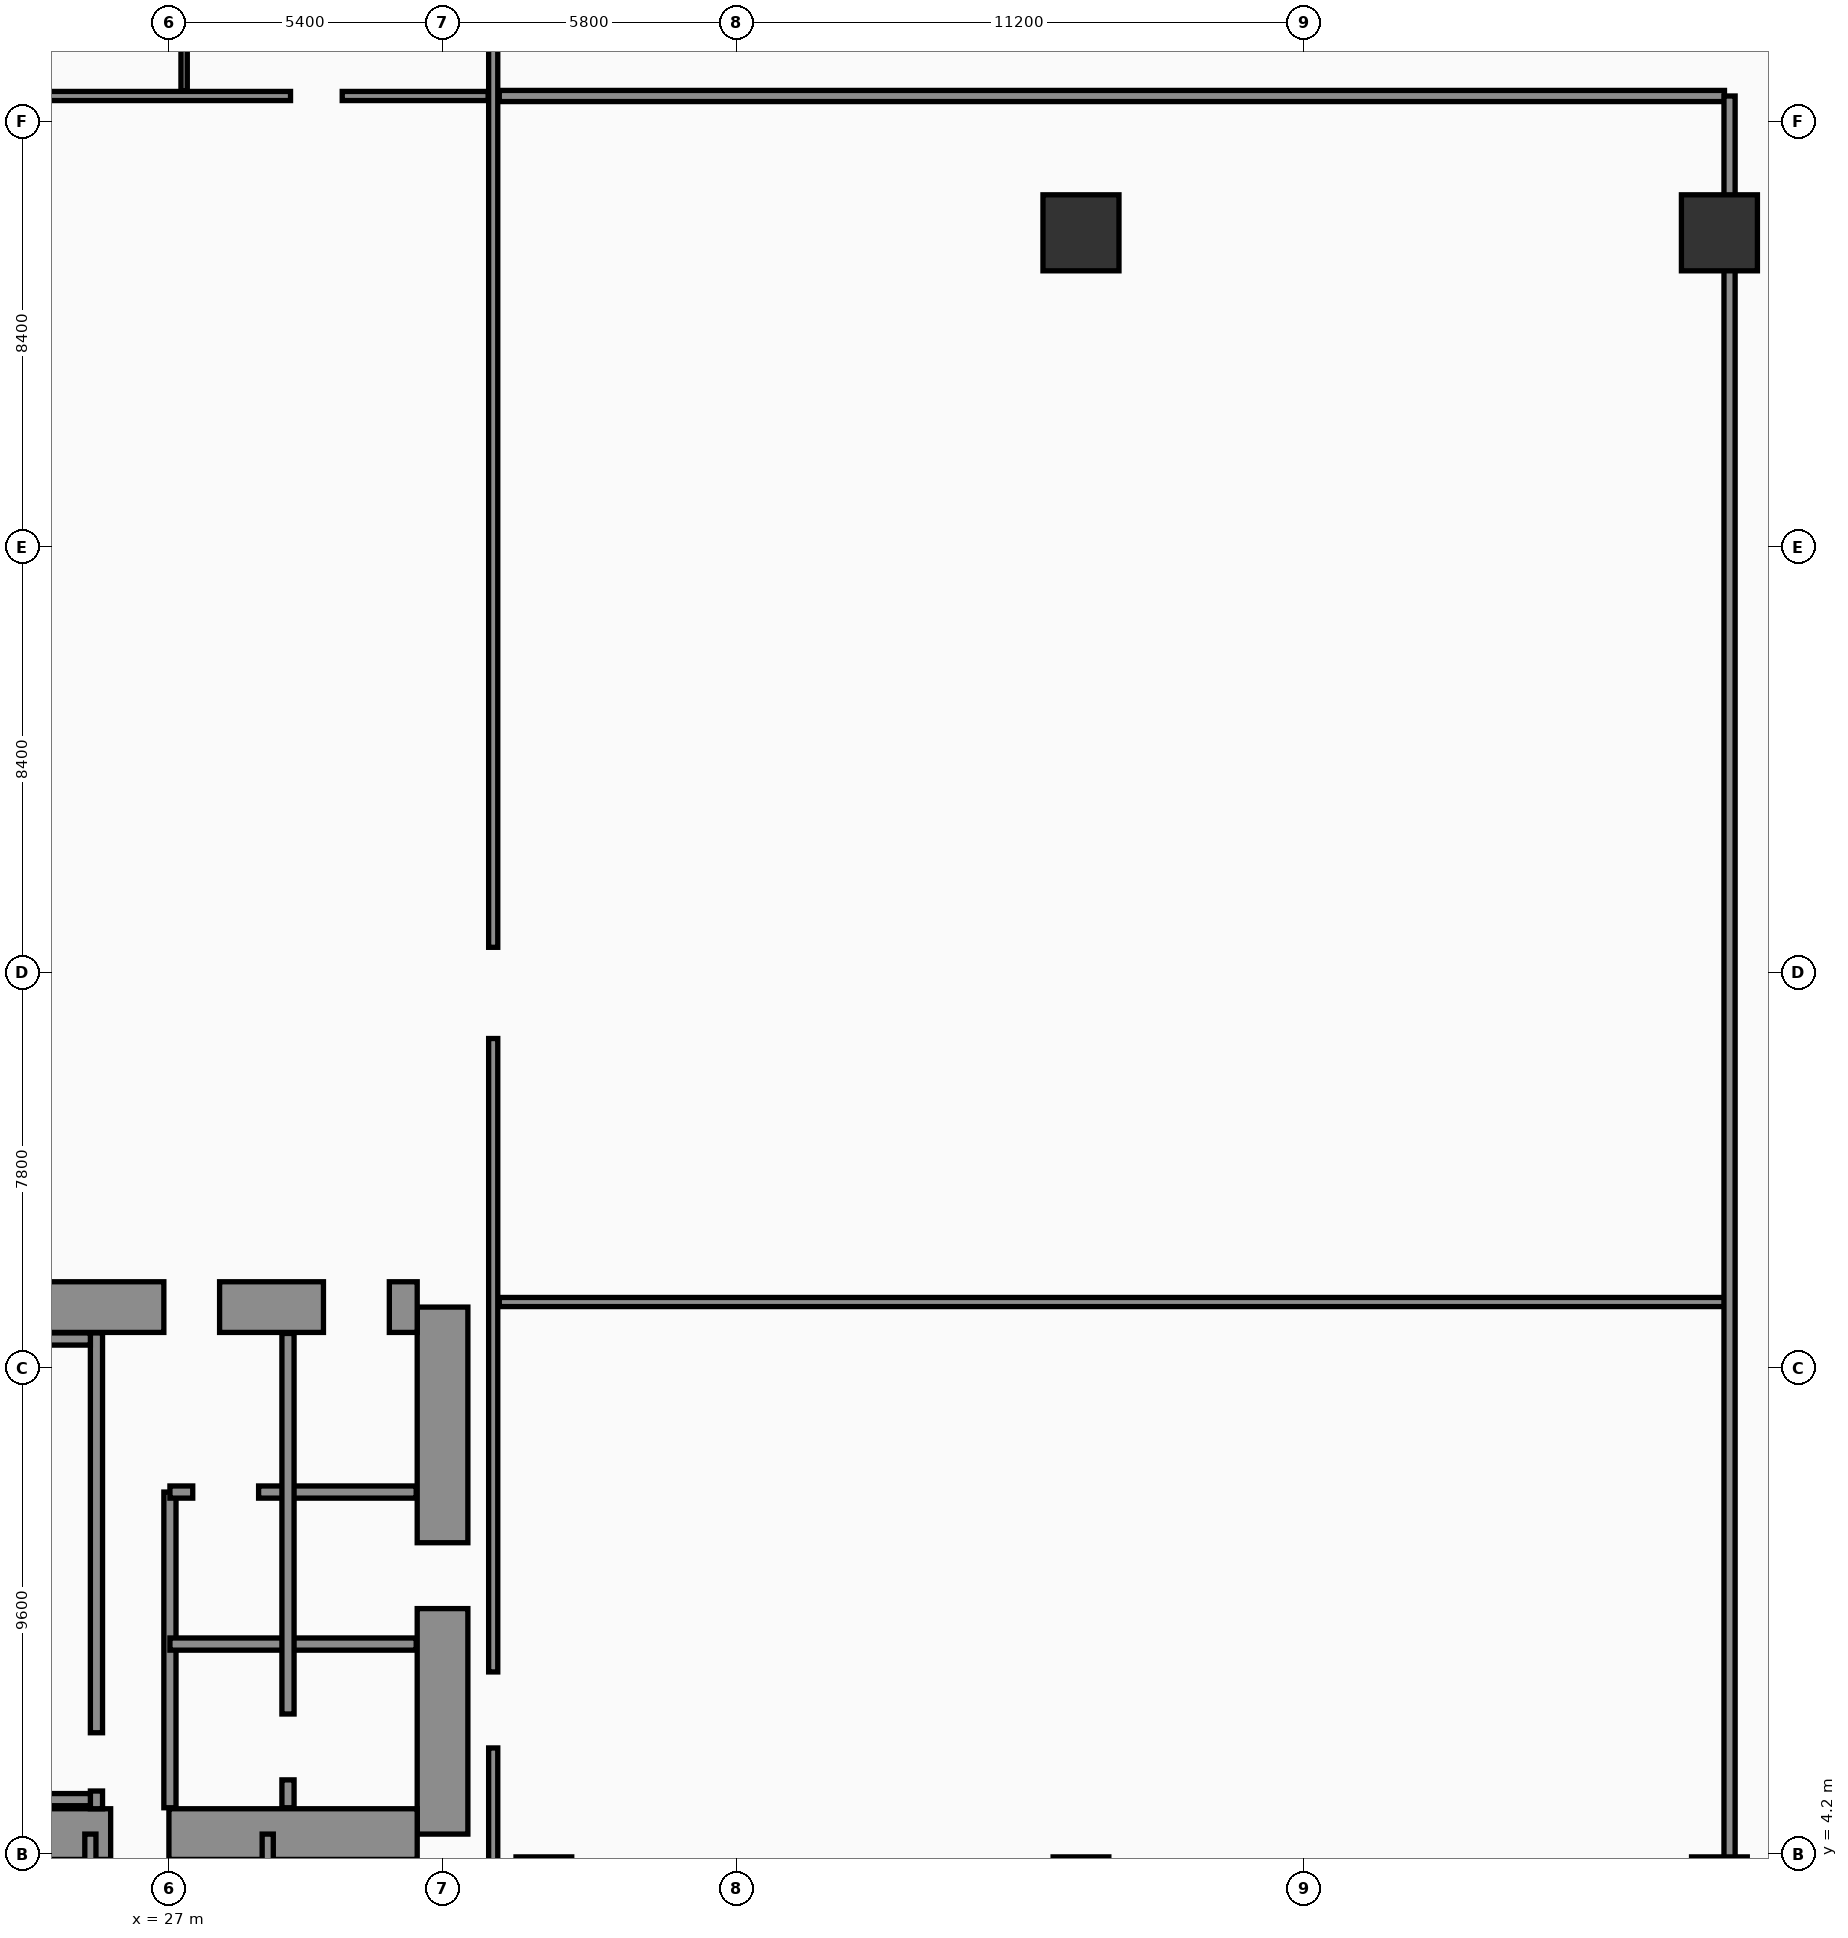
"""IFC4 building model, lengths in metres.
Left out: names, types, materials, properties, quantities, classifications, styles, units other than length and angle.
Written with IfcOpenShell. Run it as: python <this file> out.ifc"""

import sys

from ifc_helpers import new_model, si_unit, direction, frame, frame_2d, origin, origin_2d, place, context, subcontext, project, spatial, rectangle, hollow_rectangle, extrude, element, fill, save


model = new_model("IFC4")
c1 = context("Model", 3, precision=1e-05, world=origin(), true_north=direction((0.0, 1.0)))
c2 = subcontext(c1, "Body", "Model", "MODEL_VIEW")
j1 = project(units=[si_unit("LENGTHUNIT", "METRE"), si_unit("PLANEANGLEUNIT", "RADIAN")], contexts=[c1])
p1 = place(None, origin())
s1 = spatial("IfcSite", under=j1, at=p1, CompositionType="ELEMENT")
p2 = place(p1, origin())
s2 = spatial("IfcBuilding", under=s1, at=p2, CompositionType="ELEMENT")
p3 = place(p2, origin())
s3 = spatial("IfcBuildingStorey", under=s2, at=p3, CompositionType="ELEMENT", Elevation=0.0)
p4 = place(p3, frame((32.4, 4.6, 0.0), z_axis=(0.0, 0.0, 1.0), x_axis=(0.0, 1.0, 0.0)))
e1 = element("IfcWall", 1, at=p4, inside=s3, PredefinedType="SHEAR", context=c2, shape_type="SweptSolid", body=[
    extrude(rectangle(XDim=10.4, YDim=1.0, at=frame_2d((5.2, 0.0))), origin(), (0.0, 0.0, 1.0), 5.68),
])
p5 = place(p4, frame((4.45, 0.0, 0.0)))
e2 = element("IfcOpeningElement", 2, at=p5, cuts=e1, PredefinedType="OPENING", context=c2, shape_type="SweptSolid", body=[
    extrude(rectangle(XDim=1.3, YDim=2.35, at=frame_2d((0.65, 1.175))), frame((0.0, 0.51, 0.0), z_axis=(0.0, -1.0, 0.0), x_axis=(1.0, 0.0, 0.0)), (0.0, 0.0, 1.0), 1.02),
])
p6 = place(p3, frame((22.1, 15.0, 0.0), z_axis=(0.0, 0.0, 1.0), x_axis=(1.0, 0.0, 0.0)))
e3 = element("IfcWall", 3, at=p6, inside=s3, PredefinedType="SHEAR", context=c2, shape_type="SweptSolid", body=[
    extrude(rectangle(XDim=9.8, YDim=1.0, at=frame_2d((4.9, 0.0))), origin(), (0.0, 0.0, 1.0), 5.68),
])
p7 = place(p6, frame((4.8, 0.0, 0.0)))
e4 = element("IfcOpeningElement", 4, at=p7, cuts=e3, PredefinedType="OPENING", context=c2, shape_type="SweptSolid", body=[
    extrude(rectangle(XDim=1.1, YDim=2.2, at=frame_2d((0.55, 1.1))), frame((0.0, 0.51, 0.0), z_axis=(0.0, -1.0, 0.0), x_axis=(1.0, 0.0, 0.0)), (0.0, 0.0, 1.0), 1.02),
])
p8 = place(p6, frame((7.95, 0.0, 0.0)))
e5 = element("IfcOpeningElement", 5, at=p8, cuts=e3, PredefinedType="OPENING", context=c2, shape_type="SweptSolid", body=[
    extrude(rectangle(XDim=1.3, YDim=2.35, at=frame_2d((0.65, 1.175))), frame((0.0, 0.51, 0.0), z_axis=(0.0, -1.0, 0.0), x_axis=(1.0, 0.0, 0.0)), (0.0, 0.0, 1.0), 1.02),
])
p9 = place(p3, frame((22.1, 4.6, 0.0), z_axis=(0.0, 0.0, 1.0), x_axis=(1.0, 0.0, 0.0)))
e6 = element("IfcWall", 6, at=p9, inside=s3, PredefinedType="SHEAR", context=c2, shape_type="SweptSolid", body=[
    extrude(rectangle(XDim=9.8, YDim=1.0, at=frame_2d((4.9, 0.0))), origin(), (0.0, 0.0, 1.0), 5.68),
])
p10 = place(p9, frame((3.75, 0.0, 0.0)))
e7 = element("IfcOpeningElement", 7, at=p10, cuts=e6, PredefinedType="OPENING", context=c2, shape_type="SweptSolid", body=[
    extrude(rectangle(XDim=1.15, YDim=2.2, at=frame_2d((0.575, 1.1))), frame((0.0, 0.51, 0.0), z_axis=(0.0, -1.0, 0.0), x_axis=(1.0, 0.0, 0.0)), (0.0, 0.0, 1.0), 1.02),
])
p11 = place(p3, frame((25.57, 5.1, 0.0), z_axis=(0.0, 0.0, 1.0), x_axis=(0.0, 1.0, 0.0)))
e8 = element("IfcWall", 8, at=p11, inside=s3, PredefinedType="SOLIDWALL", context=c2, shape_type="SweptSolid", body=[
    extrude(rectangle(XDim=9.39, YDim=0.24, at=frame_2d((4.695, 0.0))), origin(), (0.0, 0.0, 1.0), 5.68),
])
p12 = place(p11, frame((0.35, 0.0, 0.0)))
e9 = element("IfcOpeningElement", 9, at=p12, cuts=e8, PredefinedType="OPENING", context=c2, shape_type="SweptSolid", body=[
    extrude(rectangle(XDim=1.15, YDim=2.2, at=frame_2d((0.575, 1.1))), frame((0.0, 0.13, 0.0), z_axis=(0.0, -1.0, 0.0), x_axis=(1.0, 0.0, 0.0)), (0.0, 0.0, 1.0), 0.26),
])
for number, where, z_axis, x_axis in (
    (10, (22.35, 5.28, 0.0), (0.0, 0.0, 1.0), (1.0, 0.0, 0.0)),
    (11, (22.35, 14.37, 0.0), (0.0, 0.0, 1.0), (1.0, 0.0, 0.0)),
):
    element("IfcWall", number, at=place(p3, frame(where, z_axis=z_axis, x_axis=x_axis)), inside=s3, PredefinedType="SOLIDWALL", context=c2, shape_type="SweptSolid", body=[
        extrude(rectangle(XDim=3.1, YDim=0.24, at=frame_2d((1.55, 0.0))), origin(), (0.0, 0.0, 1.0), 5.68),
    ])
for number, where, z_axis, x_axis in (
    (12, (34.4, 3.6, 0.0), (0.0, 0.0, 1.0), (1.0, 0.0, 0.0)),
    (13, (45.0, 3.6, 0.0), (0.0, 0.0, 1.0), (1.0, 0.0, 0.0)),
    (14, (57.6, 3.6, 0.0), (0.0, 0.0, 1.0), (1.0, 0.0, 0.0)),
):
    element("IfcColumn", number, at=place(p3, frame(where, z_axis=z_axis, x_axis=x_axis)), inside=s3, PredefinedType="COLUMN", context=c2, shape_type="SweptSolid", body=[
        extrude(hollow_rectangle(XDim=1.1, YDim=1.1, WallThickness=0.045, at=origin_2d()), origin(), (0.0, 0.0, 1.0), 5.68),
    ])
for number, where, z_axis, x_axis in (
    (15, (45.0, 36.2, 0.0), (0.0, 0.0, 1.0), (1.0, 0.0, 0.0)),
    (16, (57.6, 36.2, 0.0), (0.0, 0.0, 1.0), (1.0, 0.0, 0.0)),
):
    element("IfcColumn", number, at=place(p3, frame(where, z_axis=z_axis, x_axis=x_axis)), inside=s3, PredefinedType="COLUMN", context=c2, shape_type="SweptSolid", body=[
        extrude(rectangle(XDim=1.5, YDim=1.5, at=origin_2d()), origin(), (0.0, 0.0, 1.0), 5.68),
    ])
p13 = place(p3, frame((27.02, 5.12, 0.0), z_axis=(0.0, 0.0, 1.0), x_axis=(0.0, 1.0, 0.0)))
e17 = element("IfcWall", 17, at=p13, inside=s3, PredefinedType="SOLIDWALL", context=c2, shape_type="SweptSolid", body=[
    extrude(rectangle(XDim=6.23, YDim=0.24, at=frame_2d((3.115, 0.0))), origin(), (0.0, 0.0, 1.0), 5.68),
])
p14 = place(p3, frame((27.02, 11.35, 0.0), z_axis=(0.0, 0.0, 1.0), x_axis=(1.0, 0.0, 0.0)))
e18 = element("IfcWall", 18, at=p14, inside=s3, PredefinedType="SOLIDWALL", context=c2, shape_type="SweptSolid", body=[
    extrude(rectangle(XDim=4.86, YDim=0.24, at=frame_2d((2.43, 0.0))), origin(), (0.0, 0.0, 1.0), 5.68),
])
p15 = place(p14, frame((0.45, 0.0, 0.0)))
e19 = element("IfcOpeningElement", 19, at=p15, cuts=e18, PredefinedType="OPENING", context=c2, shape_type="SweptSolid", body=[
    extrude(rectangle(XDim=1.3, YDim=2.35, at=frame_2d((0.65, 1.175))), frame((0.0, 0.13, 0.0), z_axis=(0.0, -1.0, 0.0), x_axis=(1.0, 0.0, 0.0)), (0.0, 0.0, 1.0), 0.26),
])
p16 = place(p3, frame((27.02, 8.35, 0.0), z_axis=(0.0, 0.0, 1.0), x_axis=(1.0, 0.0, 0.0)))
e20 = element("IfcWall", 20, at=p16, inside=s3, PredefinedType="SOLIDWALL", context=c2, shape_type="SweptSolid", body=[
    extrude(rectangle(XDim=4.86, YDim=0.24, at=frame_2d((2.43, 0.0))), origin(), (0.0, 0.0, 1.0), 5.68),
])
p17 = place(p3, frame((29.35, 5.12, 0.0), z_axis=(0.0, 0.0, 1.0), x_axis=(0.0, 1.0, 0.0)))
e21 = element("IfcWall", 21, at=p17, inside=s3, PredefinedType="SOLIDWALL", context=c2, shape_type="SweptSolid", body=[
    extrude(rectangle(XDim=9.36, YDim=0.24, at=frame_2d((4.68, 0.0))), origin(), (0.0, 0.0, 1.0), 5.68),
])
p18 = place(p17, frame((0.55, 0.0, 0.0)))
e22 = element("IfcOpeningElement", 22, at=p18, cuts=e21, PredefinedType="OPENING", context=c2, shape_type="SweptSolid", body=[
    extrude(rectangle(XDim=1.3, YDim=2.35, at=frame_2d((0.65, 1.175))), frame((0.0, 0.13, 0.0), z_axis=(0.0, -1.0, 0.0), x_axis=(1.0, 0.0, 0.0)), (0.0, 0.0, 1.0), 0.26),
])
for number, where, z_axis, x_axis in (
    (23, (25.45, 0.25, 0.0), (0.0, 0.0, 1.0), (0.0, 1.0, 0.0)),
    (24, (28.95, 0.25, 0.0), (0.0, 0.0, 1.0), (0.0, 1.0, 0.0)),
):
    element("IfcWall", number, at=place(p3, frame(where, z_axis=z_axis, x_axis=x_axis)), inside=s3, PredefinedType="SOLIDWALL", context=c2, shape_type="SweptSolid", body=[
        extrude(rectangle(XDim=4.35, YDim=0.22, at=frame_2d((2.175, 0.0))), origin(), (0.0, 0.0, 1.0), 5.18),
    ])
p19 = place(p3, frame((15.2, 38.9, 0.0), z_axis=(0.0, 0.0, 1.0), x_axis=(1.0, 0.0, 0.0)))
e25 = element("IfcWall", 25, at=p19, inside=s3, PredefinedType="PARTITIONING", context=c2, shape_type="SweptSolid", body=[
    extrude(rectangle(XDim=18.1, YDim=0.18, at=frame_2d((9.05, 0.0))), origin(), (0.0, 0.0, 1.0), 4.88),
])
p20 = place(p19, frame((2.2, 0.0, 0.0)))
e26 = element("IfcOpeningElement", 26, at=p20, cuts=e25, PredefinedType="OPENING", context=c2, shape_type="SweptSolid", body=[
    extrude(rectangle(XDim=1.02, YDim=2.2, at=frame_2d((0.51, 1.1))), frame((0.0, 0.1, 0.0), z_axis=(0.0, -1.0, 0.0), x_axis=(1.0, 0.0, 0.0)), (0.0, 0.0, 1.0), 0.2),
])
p21 = place(p19, frame((8.2, 0.0, 0.0)))
e27 = element("IfcOpeningElement", 27, at=p21, cuts=e25, PredefinedType="OPENING", context=c2, shape_type="SweptSolid", body=[
    extrude(rectangle(XDim=1.02, YDim=2.2, at=frame_2d((0.51, 1.1))), frame((0.0, 0.1, 0.0), z_axis=(0.0, -1.0, 0.0), x_axis=(1.0, 0.0, 0.0)), (0.0, 0.0, 1.0), 0.2),
])
p22 = place(p19, frame((14.2, 0.0, 0.0)))
e28 = element("IfcOpeningElement", 28, at=p22, cuts=e25, PredefinedType="OPENING", context=c2, shape_type="SweptSolid", body=[
    extrude(rectangle(XDim=1.02, YDim=2.2, at=frame_2d((0.51, 1.1))), frame((0.0, 0.1, 0.0), z_axis=(0.0, -1.0, 0.0), x_axis=(1.0, 0.0, 0.0)), (0.0, 0.0, 1.0), 0.2),
])
p23 = place(p3, frame((27.3, 39.0, 0.0), z_axis=(0.0, 0.0, 1.0), x_axis=(0.0, 1.0, 0.0)))
e29 = element("IfcWall", 29, at=p23, inside=s3, PredefinedType="PARTITIONING", context=c2, shape_type="SweptSolid", body=[
    extrude(rectangle(XDim=6.2, YDim=0.125, at=frame_2d((3.1, 0.0))), origin(), (0.0, 0.0, 1.0), 5.68),
])
p24 = place(p3, frame((33.4, 0.3, 0.0), z_axis=(0.0, 0.0, 1.0), x_axis=(0.0, 1.0, 0.0)))
e30 = element("IfcWall", 30, at=p24, inside=s3, PredefinedType="PARTITIONING", context=c2, shape_type="SweptSolid", body=[
    extrude(rectangle(XDim=57.64, YDim=0.18, at=frame_2d((28.82, 0.0))), origin(), (0.0, 0.0, 1.0), 4.88),
])
p25 = place(p24, frame((6.0, 0.0, 0.0)))
e31 = element("IfcOpeningElement", 31, at=p25, cuts=e30, PredefinedType="OPENING", context=c2, shape_type="SweptSolid", body=[
    extrude(rectangle(XDim=1.5, YDim=2.22, at=frame_2d((0.75, 1.11))), frame((0.0, 0.1, 0.0), z_axis=(0.0, -1.0, 0.0), x_axis=(1.0, 0.0, 0.0)), (0.0, 0.0, 1.0), 0.2),
])
p26 = place(p24, frame((20.0, 0.0, 0.0)))
e32 = element("IfcOpeningElement", 32, at=p26, cuts=e30, PredefinedType="OPENING", context=c2, shape_type="SweptSolid", body=[
    extrude(rectangle(XDim=1.8, YDim=2.4, at=frame_2d((0.9, 1.2))), frame((0.0, 0.1, 0.0), z_axis=(0.0, -1.0, 0.0), x_axis=(1.0, 0.0, 0.0)), (0.0, 0.0, 1.0), 0.2),
])
p27 = place(p24, frame((49.0, 0.0, 0.0)))
e33 = element("IfcOpeningElement", 33, at=p27, cuts=e30, PredefinedType="OPENING", context=c2, shape_type="SweptSolid", body=[
    extrude(rectangle(XDim=1.6, YDim=2.35, at=frame_2d((0.8, 1.175))), frame((0.0, 0.1, 0.0), z_axis=(0.0, -1.0, 0.0), x_axis=(1.0, 0.0, 0.0)), (0.0, 0.0, 1.0), 0.2),
])
p28 = place(p3, frame((33.52, 15.1, 0.0), z_axis=(0.0, 0.0, 1.0), x_axis=(1.0, 0.0, 0.0)))
e34 = element("IfcWall", 34, at=p28, inside=s3, PredefinedType="PARTITIONING", context=c2, shape_type="SweptSolid", body=[
    extrude(rectangle(XDim=24.18, YDim=0.18, at=frame_2d((12.09, 0.0))), origin(), (0.0, 0.0, 1.0), 4.18),
])
p29 = place(p3, frame((33.52, 38.9, 0.0), z_axis=(0.0, 0.0, 1.0), x_axis=(1.0, 0.0, 0.0)))
e35 = element("IfcWall", 35, at=p29, inside=s3, PredefinedType="SOLIDWALL", context=c2, shape_type="SweptSolid", body=[
    extrude(rectangle(XDim=24.18, YDim=0.22, at=frame_2d((12.09, 0.0))), origin(), (0.0, 0.0, 1.0), 4.88),
])
p30 = place(p3, frame((57.8, 0.06, 0.0), z_axis=(0.0, 0.0, 1.0), x_axis=(0.0, 1.0, 0.0)))
e36 = element("IfcWall", 36, at=p30, inside=s3, PredefinedType="SOLIDWALL", context=c2, shape_type="SweptSolid", body=[
    extrude(rectangle(XDim=38.84, YDim=0.22, at=frame_2d((19.42, 0.0))), origin(), (0.0, 0.0, 1.0), 4.18),
])
p31 = place(p15, origin())
e37 = element("IfcDoor", 37, at=p31, inside=s3, OperationType="DOUBLE_DOOR_SLIDING", PredefinedType="DOOR", context=c2, shape_type="SweptSolid", body=[
    extrude(rectangle(XDim=1.3, YDim=2.35, at=frame_2d((0.65, 1.175))), frame((0.0, 0.025, 0.0), z_axis=(0.0, -1.0, 0.0), x_axis=(1.0, 0.0, 0.0)), (0.0, 0.0, 1.0), 0.05),
])
fill(e19, e37)
p32 = place(p18, origin())
e38 = element("IfcDoor", 38, at=p32, inside=s3, OperationType="DOUBLE_DOOR_SLIDING", PredefinedType="DOOR", context=c2, shape_type="SweptSolid", body=[
    extrude(rectangle(XDim=1.3, YDim=2.35, at=frame_2d((0.65, 1.175))), frame((0.0, 0.025, 0.0), z_axis=(0.0, -1.0, 0.0), x_axis=(1.0, 0.0, 0.0)), (0.0, 0.0, 1.0), 0.05),
])
fill(e22, e38)
p33 = place(p22, origin())
e39 = element("IfcDoor", 39, at=p33, inside=s3, OperationType="SINGLE_SWING_LEFT", PredefinedType="DOOR", context=c2, shape_type="SweptSolid", body=[
    extrude(rectangle(XDim=1.02, YDim=2.2, at=frame_2d((0.51, 1.1))), frame((0.0, 0.025, 0.0), z_axis=(0.0, -1.0, 0.0), x_axis=(1.0, 0.0, 0.0)), (0.0, 0.0, 1.0), 0.05),
])
fill(e28, e39)
p34 = place(p25, origin())
e40 = element("IfcDoor", 40, at=p34, inside=s3, OperationType="SINGLE_SWING_RIGHT", PredefinedType="DOOR", context=c2, shape_type="SweptSolid", body=[
    extrude(rectangle(XDim=1.5, YDim=2.22, at=frame_2d((0.75, 1.11))), frame((0.0, 0.025, 0.0), z_axis=(0.0, -1.0, 0.0), x_axis=(1.0, 0.0, 0.0)), (0.0, 0.0, 1.0), 0.05),
])
fill(e31, e40)
p35 = place(p26, origin())
e41 = element("IfcDoor", 41, at=p35, inside=s3, OperationType="SINGLE_SWING_LEFT", PredefinedType="DOOR", context=c2, shape_type="SweptSolid", body=[
    extrude(rectangle(XDim=1.8, YDim=2.4, at=frame_2d((0.9, 1.2))), frame((0.0, 0.025, 0.0), z_axis=(0.0, -1.0, 0.0), x_axis=(1.0, 0.0, 0.0)), (0.0, 0.0, 1.0), 0.05),
])
fill(e32, e41)
p36 = place(p12, origin())
e42 = element("IfcDoor", 42, at=p36, inside=s3, OperationType="SINGLE_SWING_RIGHT", PredefinedType="DOOR", context=c2, shape_type="SweptSolid", body=[
    extrude(rectangle(XDim=1.15, YDim=2.2, at=frame_2d((0.575, 1.1))), frame((0.0, 0.025, 0.0), z_axis=(0.0, -1.0, 0.0), x_axis=(1.0, 0.0, 0.0)), (0.0, 0.0, 1.0), 0.05),
])
fill(e9, e42)
p37 = place(p10, origin())
e43 = element("IfcDoor", 43, at=p37, inside=s3, OperationType="SINGLE_SWING_RIGHT", PredefinedType="DOOR", context=c2, shape_type="SweptSolid", body=[
    extrude(rectangle(XDim=1.15, YDim=2.2, at=frame_2d((0.575, 1.1))), frame((0.0, 0.025, 0.0), z_axis=(0.0, -1.0, 0.0), x_axis=(1.0, 0.0, 0.0)), (0.0, 0.0, 1.0), 0.05),
])
fill(e7, e43)
p38 = place(p7, origin())
e44 = element("IfcDoor", 44, at=p38, inside=s3, OperationType="SINGLE_SWING_RIGHT", PredefinedType="DOOR", context=c2, shape_type="SweptSolid", body=[
    extrude(rectangle(XDim=1.1, YDim=2.2, at=frame_2d((0.55, 1.1))), frame((0.0, 0.025, 0.0), z_axis=(0.0, -1.0, 0.0), x_axis=(1.0, 0.0, 0.0)), (0.0, 0.0, 1.0), 0.05),
])
fill(e4, e44)
p39 = place(p8, origin())
e45 = element("IfcDoor", 45, at=p39, inside=s3, OperationType="DOUBLE_DOOR_SLIDING", PredefinedType="DOOR", context=c2, shape_type="SweptSolid", body=[
    extrude(rectangle(XDim=1.3, YDim=2.35, at=frame_2d((0.65, 1.175))), frame((0.0, 0.025, 0.0), z_axis=(0.0, -1.0, 0.0), x_axis=(1.0, 0.0, 0.0)), (0.0, 0.0, 1.0), 0.05),
])
fill(e5, e45)
p40 = place(p5, origin())
e46 = element("IfcDoor", 46, at=p40, inside=s3, OperationType="DOUBLE_DOOR_SLIDING", PredefinedType="DOOR", context=c2, shape_type="SweptSolid", body=[
    extrude(rectangle(XDim=1.3, YDim=2.35, at=frame_2d((0.65, 1.175))), frame((0.0, 0.025, 0.0), z_axis=(0.0, -1.0, 0.0), x_axis=(1.0, 0.0, 0.0)), (0.0, 0.0, 1.0), 0.05),
])
fill(e2, e46)
save(model, sys.argv[1])
